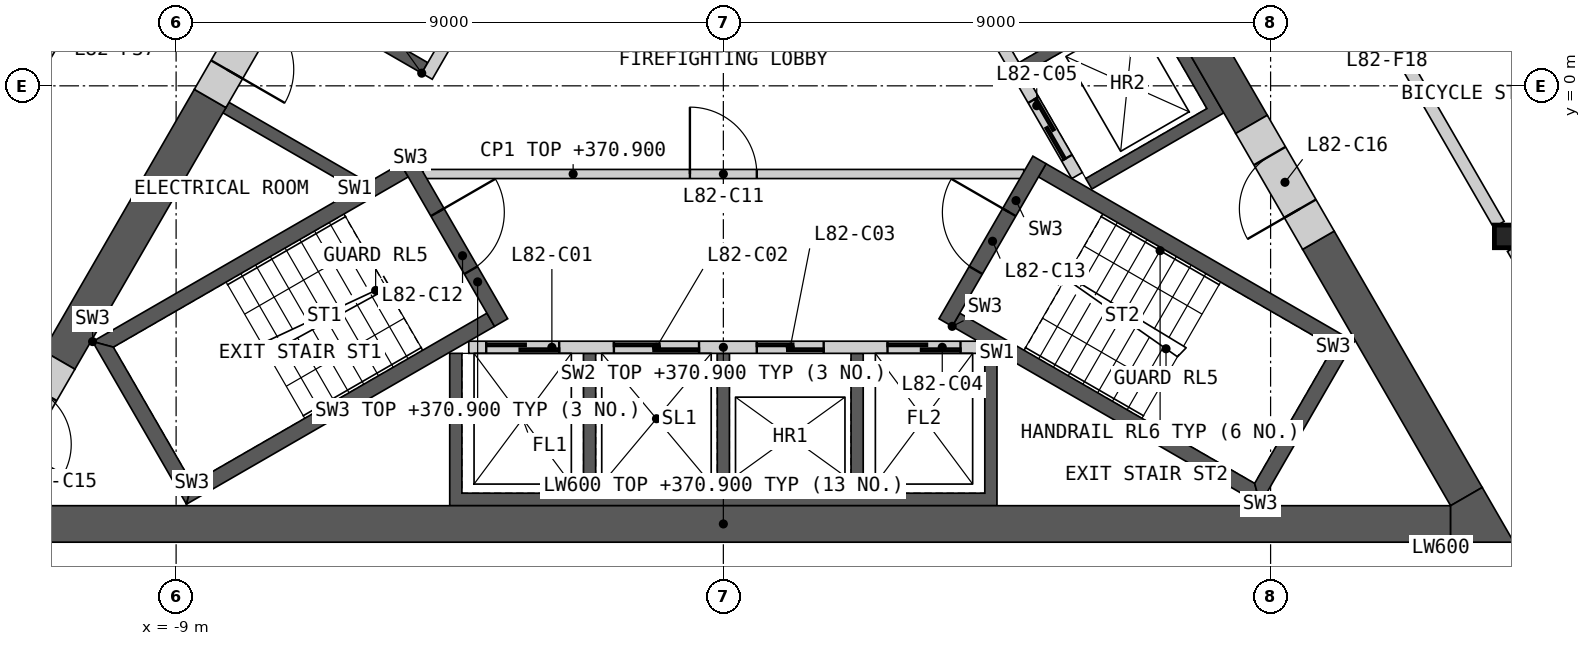
"""IFC4 building model, lengths in metres.
Left out: names, types, materials, properties, quantities, classifications, styles, units other than length and angle.
Written with IfcOpenShell. Run it as: python <this file> out.ifc"""

import sys

from ifc_helpers import new_model, si_unit, direction, frame, frame_2d, origin, origin_2d, place, context, subcontext, project, spatial, polyline, rectangle, i_section, outline, extrude, element, fill, save


model = new_model("IFC4")
c1 = context("Model", 3, precision=1e-05, world=origin(), true_north=direction((0.0, 1.0)))
c2 = subcontext(c1, "Body", "Model", "MODEL_VIEW")
j1 = project(units=[si_unit("LENGTHUNIT", "METRE"), si_unit("PLANEANGLEUNIT", "RADIAN")], contexts=[c1])
p1 = place(None, origin())
s1 = spatial("IfcSite", under=j1, at=p1, CompositionType="ELEMENT")
p2 = place(p1, origin())
s2 = spatial("IfcBuilding", under=s1, at=p2, CompositionType="ELEMENT")
p3 = place(p2, frame((0.0, 0.0, 367.8)))
s3 = spatial("IfcBuildingStorey", under=s2, at=p3, CompositionType="ELEMENT", Elevation=367.8)
p4 = place(p3, frame((12.868, -2.476, 0.0), z_axis=(0.0, 0.0, 1.0), x_axis=(1.0, 0.0, 0.0)))
e1 = element("IfcColumn", 1, at=p4, inside=s3, PredefinedType="COLUMN", context=c2, shape_type="SweptSolid", body=[
    extrude(i_section(OverallWidth=0.374, OverallDepth=0.372, WebThickness=0.016, FlangeThickness=0.026, at=origin_2d()), origin(), (0.0, 0.0, 1.0), 3.4),
])
p5 = place(p3, origin())
e2 = element("IfcWall", 2, at=p5, inside=s3, PredefinedType="SHEAR", context=c2, shape_type="SweptSolid", body=[
    extrude(outline(polyline([(4.5, -4.4), (4.5, -6.906), (-4.5, -6.906), (-4.5, -4.4), (-4.3, -4.4), (-4.3, -6.7), (-2.3, -6.7), (-2.3, -4.4), (-2.1, -4.4), (-2.1, -6.7), (-0.1, -6.7), (-0.1, -4.4), (0.1, -4.4), (0.1, -6.7), (2.1, -6.7), (2.1, -4.4), (2.3, -4.4), (2.3, -6.7), (4.3, -6.7), (4.3, -4.4), (4.5, -4.4)])), origin(), (0.0, 0.0, 1.0), 3.1),
])
p6 = place(p3, frame((-4.187, -4.3, 0.0), z_axis=(0.0, 0.0, 1.0), x_axis=(1.0, 0.0, 0.0)))
e3 = element("IfcWall", 3, at=p6, inside=s3, PredefinedType="SOLIDWALL", context=c2, shape_type="SweptSolid", body=[
    extrude(rectangle(XDim=8.373, YDim=0.2, at=frame_2d((4.187, 0.0))), origin(), (0.0, 0.0, 1.0), 3.1),
])
p7 = place(p6, frame((0.287, 0.0, 0.0)))
e4 = element("IfcOpeningElement", 4, at=p7, cuts=e3, PredefinedType="OPENING", context=c2, shape_type="SweptSolid", body=[
    extrude(rectangle(XDim=1.2, YDim=2.1, at=frame_2d((0.6, 1.05))), frame((0.0, 0.11, 0.0), z_axis=(0.0, -1.0, 0.0), x_axis=(1.0, 0.0, 0.0)), (0.0, 0.0, 1.0), 0.22),
])
p8 = place(p6, frame((2.387, 0.0, 0.0)))
e5 = element("IfcOpeningElement", 5, at=p8, cuts=e3, PredefinedType="OPENING", context=c2, shape_type="SweptSolid", body=[
    extrude(rectangle(XDim=1.4, YDim=2.1, at=frame_2d((0.7, 1.05))), frame((0.0, 0.11, 0.0), z_axis=(0.0, -1.0, 0.0), x_axis=(1.0, 0.0, 0.0)), (0.0, 0.0, 1.0), 0.22),
])
p9 = place(p6, frame((4.737, 0.0, 0.0)))
e6 = element("IfcOpeningElement", 6, at=p9, cuts=e3, PredefinedType="OPENING", context=c2, shape_type="SweptSolid", body=[
    extrude(rectangle(XDim=1.1, YDim=2.1, at=frame_2d((0.55, 1.05))), frame((0.0, 0.11, 0.0), z_axis=(0.0, -1.0, 0.0), x_axis=(1.0, 0.0, 0.0)), (0.0, 0.0, 1.0), 0.22),
])
p10 = place(p6, frame((6.887, 0.0, 0.0)))
e7 = element("IfcOpeningElement", 7, at=p10, cuts=e3, PredefinedType="OPENING", context=c2, shape_type="SweptSolid", body=[
    extrude(rectangle(XDim=1.2, YDim=2.1, at=frame_2d((0.6, 1.05))), frame((0.0, 0.11, 0.0), z_axis=(0.0, -1.0, 0.0), x_axis=(1.0, 0.0, 0.0)), (0.0, 0.0, 1.0), 0.22),
])
p11 = place(p3, origin())
e8 = element("IfcWall", 8, at=p11, inside=s3, PredefinedType="SHEAR", context=c2, shape_type="SweptSolid", body=[
    extrude(outline(polyline([(1.561, 6.097), (3.731, 7.35), (8.231, -0.444), (6.061, -1.697), (5.96, -1.524), (7.952, -0.374), (6.952, 1.358), (4.96, 0.208), (4.861, 0.381), (6.852, 1.531), (5.852, 3.263), (3.861, 2.113), (3.76, 2.287), (5.752, 3.437), (4.752, 5.169), (2.76, 4.019), (2.66, 4.192), (4.652, 5.342), (3.652, 7.074), (1.66, 5.924), (1.561, 6.097)])), origin(), (0.0, 0.0, 1.0), 3.1),
])
p12 = place(p3, frame((5.817, -1.476, 0.0), z_axis=(0.0, 0.0, 1.0), x_axis=(-0.500002616675, 0.866023893041, 0.0)))
e9 = element("IfcWall", 9, at=p12, inside=s3, PredefinedType="SOLIDWALL", context=c2, shape_type="SweptSolid", body=[
    extrude(rectangle(XDim=8.373, YDim=0.2, at=frame_2d((4.187, 0.0))), origin(), (0.0, 0.0, 1.0), 3.1),
])
p13 = place(p12, frame((0.337, 0.0, 0.0)))
e10 = element("IfcOpeningElement", 10, at=p13, cuts=e9, PredefinedType="OPENING", context=c2, shape_type="SweptSolid", body=[
    extrude(rectangle(XDim=1.1, YDim=2.1, at=frame_2d((0.55, 1.05))), frame((0.0, 0.11, 0.0), z_axis=(0.0, -1.0, 0.0), x_axis=(1.0, 0.0, 0.0)), (0.0, 0.0, 1.0), 0.22),
])
p14 = place(p12, frame((2.537, 0.0, 0.0)))
e11 = element("IfcOpeningElement", 11, at=p14, cuts=e9, PredefinedType="OPENING", context=c2, shape_type="SweptSolid", body=[
    extrude(rectangle(XDim=1.1, YDim=2.1, at=frame_2d((0.55, 1.05))), frame((0.0, 0.11, 0.0), z_axis=(0.0, -1.0, 0.0), x_axis=(1.0, 0.0, 0.0)), (0.0, 0.0, 1.0), 0.22),
])
p15 = place(p12, frame((4.737, 0.0, 0.0)))
e12 = element("IfcOpeningElement", 12, at=p15, cuts=e9, PredefinedType="OPENING", context=c2, shape_type="SweptSolid", body=[
    extrude(rectangle(XDim=1.1, YDim=2.1, at=frame_2d((0.55, 1.05))), frame((0.0, 0.11, 0.0), z_axis=(0.0, -1.0, 0.0), x_axis=(1.0, 0.0, 0.0)), (0.0, 0.0, 1.0), 0.22),
])
p16 = place(p12, frame((7.037, 0.0, 0.0)))
e13 = element("IfcOpeningElement", 13, at=p16, cuts=e9, PredefinedType="OPENING", context=c2, shape_type="SweptSolid", body=[
    extrude(rectangle(XDim=0.9, YDim=2.1, at=frame_2d((0.45, 1.05))), frame((0.0, 0.11, 0.0), z_axis=(0.0, -1.0, 0.0), x_axis=(1.0, 0.0, 0.0)), (0.0, 0.0, 1.0), 0.22),
])
p17 = place(p3, origin())
e14 = element("IfcWall", 14, at=p17, inside=s3, PredefinedType="SHEAR", context=c2, shape_type="SweptSolid", body=[
    extrude(outline(polyline([(-6.061, -1.697), (-8.231, -0.444), (-8.131, -0.271), (-5.96, -1.524), (-6.061, -1.697)])), origin(), (0.0, 0.0, 1.0), 3.1),
])
p18 = place(p3, origin())
e15 = element("IfcWall", 15, at=p18, inside=s3, PredefinedType="SHEAR", context=c2, shape_type="SweptSolid", body=[
    extrude(outline(polyline([(-4.96, 0.208), (-7.131, 1.461), (-3.731, 7.35), (-1.561, 6.097), (-1.66, 5.924), (-3.652, 7.074), (-5.752, 3.437), (-3.76, 2.287), (-3.861, 2.113), (-5.852, 3.263), (-6.852, 1.531), (-4.861, 0.381), (-4.96, 0.208)])), origin(), (0.0, 0.0, 1.0), 3.1),
])
p19 = place(p3, frame((-1.631, 5.776, 0.0), z_axis=(0.0, 0.0, 1.0), x_axis=(-0.499992876559, -0.866029516466, 0.0)))
e16 = element("IfcWall", 16, at=p19, inside=s3, PredefinedType="SOLIDWALL", context=c2, shape_type="SweptSolid", body=[
    extrude(rectangle(XDim=6.486, YDim=0.2, at=frame_2d((3.243, 0.0))), origin(), (0.0, 0.0, 1.0), 3.1),
])
p20 = place(p19, frame((1.537, 0.0, 0.0)))
e17 = element("IfcOpeningElement", 17, at=p20, cuts=e16, PredefinedType="OPENING", context=c2, shape_type="SweptSolid", body=[
    extrude(rectangle(XDim=0.9, YDim=2.1, at=frame_2d((0.45, 1.05))), frame((0.0, 0.11, 0.0), z_axis=(0.0, -1.0, 0.0), x_axis=(1.0, 0.0, 0.0)), (0.0, 0.0, 1.0), 0.22),
])
p21 = place(p19, frame((4.837, 0.0, 0.0)))
e18 = element("IfcOpeningElement", 18, at=p21, cuts=e16, PredefinedType="OPENING", context=c2, shape_type="SweptSolid", body=[
    extrude(rectangle(XDim=0.9, YDim=2.1, at=frame_2d((0.45, 1.05))), frame((0.0, 0.11, 0.0), z_axis=(0.0, -1.0, 0.0), x_axis=(1.0, 0.0, 0.0)), (0.0, 0.0, 1.0), 0.22),
])
p22 = place(p3, frame((-4.941, -1.45, 0.0), z_axis=(0.0, 0.0, 1.0), x_axis=(1.0, 0.0, 0.0)))
e19 = element("IfcWall", 19, at=p22, inside=s3, PredefinedType="PARTITIONING", context=c2, shape_type="SweptSolid", body=[
    extrude(rectangle(XDim=9.882, YDim=0.15, at=frame_2d((4.941, 0.0))), origin(), (0.0, 0.0, 1.0), 3.1),
])
p23 = place(p22, frame((4.391, 0.0, 0.0)))
e20 = element("IfcOpeningElement", 20, at=p23, cuts=e19, PredefinedType="OPENING", context=c2, shape_type="SweptSolid", body=[
    extrude(rectangle(XDim=1.1, YDim=2.1, at=frame_2d((0.55, 1.05))), frame((0.0, 0.085, 0.0), z_axis=(0.0, -1.0, 0.0), x_axis=(1.0, 0.0, 0.0)), (0.0, 0.0, 1.0), 0.17),
])
p24 = place(p3, origin())
e21 = element("IfcWall", 21, at=p24, inside=s3, PredefinedType="SHEAR", context=c2, shape_type="SweptSolid", body=[
    extrude(outline(polyline([(-5.307, -1.281), (-10.374, -4.206), (-10.032, -4.298), (-5.182, -1.498), (-5.307, -1.281)])), origin(), (0.0, 0.0, 1.0), 3.1),
])
p25 = place(p3, origin())
e22 = element("IfcWall", 22, at=p25, inside=s3, PredefinedType="SHEAR", context=c2, shape_type="SweptSolid", body=[
    extrude(outline(polyline([(-10.374, -4.206), (-8.83, -6.881), (-8.738, -6.539), (-10.032, -4.298), (-10.374, -4.206)])), origin(), (0.0, 0.0, 1.0), 3.1),
])
p26 = place(p3, origin())
e23 = element("IfcWall", 23, at=p26, inside=s3, PredefinedType="SHEAR", context=c2, shape_type="SweptSolid", body=[
    extrude(outline(polyline([(-8.738, -6.539), (-8.83, -6.881), (-3.763, -3.956), (-3.888, -3.739), (-8.738, -6.539)])), origin(), (0.0, 0.0, 1.0), 3.1),
])
p27 = place(p3, frame((-5.199, -1.219, 0.0), z_axis=(0.0, 0.0, 1.0), x_axis=(0.499982516597, -0.866035497597, 0.0)))
e24 = element("IfcWall", 24, at=p27, inside=s3, PredefinedType="SHEAR", context=c2, shape_type="SweptSolid", body=[
    extrude(rectangle(XDim=3.088, YDim=0.25, at=frame_2d((1.544, 0.0))), origin(), (0.0, 0.0, 1.0), 3.1),
])
p28 = place(p27, frame((0.994, 0.0, 0.0)))
e25 = element("IfcOpeningElement", 25, at=p28, cuts=e24, PredefinedType="OPENING", context=c2, shape_type="SweptSolid", body=[
    extrude(rectangle(XDim=1.1, YDim=2.1, at=frame_2d((0.55, 1.05))), frame((0.0, 0.135, 0.0), z_axis=(0.0, -1.0, 0.0), x_axis=(1.0, 0.0, 0.0)), (0.0, 0.0, 1.0), 0.27),
])
p29 = place(p3, origin())
e26 = element("IfcWall", 26, at=p29, inside=s3, PredefinedType="SHEAR", context=c2, shape_type="SweptSolid", body=[
    extrude(outline(polyline([(3.763, -3.956), (8.83, -6.881), (8.738, -6.539), (3.888, -3.739), (3.763, -3.956)])), origin(), (0.0, 0.0, 1.0), 3.1),
])
p30 = place(p3, origin())
e27 = element("IfcWall", 27, at=p30, inside=s3, PredefinedType="SHEAR", context=c2, shape_type="SweptSolid", body=[
    extrude(outline(polyline([(8.83, -6.881), (10.374, -4.206), (10.032, -4.298), (8.738, -6.539), (8.83, -6.881)])), origin(), (0.0, 0.0, 1.0), 3.1),
])
p31 = place(p3, origin())
e28 = element("IfcWall", 28, at=p31, inside=s3, PredefinedType="SHEAR", context=c2, shape_type="SweptSolid", body=[
    extrude(outline(polyline([(10.032, -4.298), (10.374, -4.206), (5.307, -1.281), (5.182, -1.498), (10.032, -4.298)])), origin(), (0.0, 0.0, 1.0), 3.1),
])
p32 = place(p3, frame((3.655, -3.893, 0.0), z_axis=(0.0, 0.0, 1.0), x_axis=(0.499982516597, 0.866035497597, 0.0)))
e29 = element("IfcWall", 29, at=p32, inside=s3, PredefinedType="SHEAR", context=c2, shape_type="SweptSolid", body=[
    extrude(rectangle(XDim=3.088, YDim=0.25, at=frame_2d((1.544, 0.0))), origin(), (0.0, 0.0, 1.0), 3.1),
])
p33 = place(p32, frame((0.994, 0.0, 0.0)))
e30 = element("IfcOpeningElement", 30, at=p33, cuts=e29, PredefinedType="OPENING", context=c2, shape_type="SweptSolid", body=[
    extrude(rectangle(XDim=1.1, YDim=2.1, at=frame_2d((0.55, 1.05))), frame((0.0, 0.135, 0.0), z_axis=(0.0, -1.0, 0.0), x_axis=(1.0, 0.0, 0.0)), (0.0, 0.0, 1.0), 0.27),
])
p34 = place(p3, frame((-11.961, -7.206, 0.0), z_axis=(0.0, 0.0, 1.0), x_axis=(1.0, 0.0, 0.0)))
e31 = element("IfcWall", 31, at=p34, inside=s3, PredefinedType="SHEAR", context=c2, shape_type="SweptSolid", body=[
    extrude(rectangle(XDim=23.921, YDim=0.6, at=frame_2d((11.961, 0.0))), origin(), (0.0, 0.0, 1.0), 3.1),
])
p35 = place(p3, frame((8.686, -0.634, 0.0), z_axis=(0.0, 0.0, 1.0), x_axis=(-0.50001836461, 0.866014800712, 0.0)))
e32 = element("IfcWall", 32, at=p35, inside=s3, PredefinedType="SHEAR", context=c2, shape_type="SweptSolid", body=[
    extrude(rectangle(XDim=10.451, YDim=0.6, at=frame_2d((5.225, 0.0))), origin(), (0.0, 0.0, 1.0), 3.1),
])
p36 = place(p3, frame((12.221, -6.756, 0.0), z_axis=(0.0, 0.0, 1.0), x_axis=(-0.50000604952, 0.866021911064, 0.0)))
e33 = element("IfcWall", 33, at=p36, inside=s3, PredefinedType="SHEAR", context=c2, shape_type="SweptSolid", body=[
    extrude(rectangle(XDim=4.869, YDim=0.6, at=frame_2d((2.434, 0.0))), origin(), (0.0, 0.0, 1.0), 3.1),
])
p37 = place(p3, frame((-8.44, -0.208, 0.0), z_axis=(0.0, 0.0, 1.0), x_axis=(-0.500007425856, -0.866021116422, 0.0)))
e34 = element("IfcWall", 34, at=p37, inside=s3, PredefinedType="SHEAR", context=c2, shape_type="SweptSolid", body=[
    extrude(rectangle(XDim=4.969, YDim=0.6, at=frame_2d((2.484, 0.0))), origin(), (0.0, 0.0, 1.0), 3.1),
])
p38 = place(p3, origin())
e35 = element("IfcWall", 35, at=p38, inside=s3, PredefinedType="SHEAR", context=c2, shape_type="SweptSolid", body=[
    extrude(outline(polyline([(11.961, -7.506), (11.961, -6.906), (12.48, -6.606), (13.0, -7.506), (11.961, -7.506)])), origin(), (0.0, 0.0, 1.0), 3.1),
])
p39 = place(p3, frame((-10.925, -4.511, 0.0), z_axis=(0.0, 0.0, 1.0), x_axis=(-0.500018667571, -0.866014625789, 0.0)))
e36 = element("IfcWall", 36, at=p39, inside=s3, PredefinedType="SHEAR", context=c2, shape_type="SweptSolid", body=[
    extrude(rectangle(XDim=2.592, YDim=0.6, at=frame_2d((1.296, 0.0))), origin(), (0.0, 0.0, 1.0), 3.1),
])
p40 = place(p39, frame((0.6, 0.0, 0.0)))
e37 = element("IfcOpeningElement", 37, at=p40, cuts=e36, PredefinedType="OPENING", context=c2, shape_type="SweptSolid", body=[
    extrude(rectangle(XDim=1.0, YDim=2.1, at=frame_2d((0.5, 1.05))), frame((0.0, 0.31, 0.0), z_axis=(0.0, -1.0, 0.0), x_axis=(1.0, 0.0, 0.0)), (0.0, 0.0, 1.0), 0.62),
])
p41 = place(p3, frame((9.786, -2.539, 0.0), z_axis=(0.0, 0.0, 1.0), x_axis=(-0.499981787252, 0.866035918664, 0.0)))
e38 = element("IfcWall", 38, at=p41, inside=s3, PredefinedType="SHEAR", context=c2, shape_type="SweptSolid", body=[
    extrude(rectangle(XDim=2.2, YDim=0.6, at=frame_2d((1.1, 0.0))), origin(), (0.0, 0.0, 1.0), 3.1),
])
p42 = place(p41, frame((0.6, 0.0, 0.0)))
e39 = element("IfcOpeningElement", 39, at=p42, cuts=e38, PredefinedType="OPENING", context=c2, shape_type="SweptSolid", body=[
    extrude(rectangle(XDim=1.0, YDim=2.1, at=frame_2d((0.5, 1.05))), frame((0.0, 0.31, 0.0), z_axis=(0.0, -1.0, 0.0), x_axis=(1.0, 0.0, 0.0)), (0.0, 0.0, 1.0), 0.62),
])
p43 = place(p3, frame((-7.34, 1.698, 0.0), z_axis=(0.0, 0.0, 1.0), x_axis=(-0.50002983664, -0.866008176907, 0.0)))
e40 = element("IfcWall", 40, at=p43, inside=s3, PredefinedType="SHEAR", context=c2, shape_type="SweptSolid", body=[
    extrude(rectangle(XDim=2.2, YDim=0.6, at=frame_2d((1.1, 0.0))), origin(), (0.0, 0.0, 1.0), 3.1),
])
p44 = place(p43, frame((0.55, 0.0, 0.0)))
e41 = element("IfcOpeningElement", 41, at=p44, cuts=e40, PredefinedType="OPENING", context=c2, shape_type="SweptSolid", body=[
    extrude(rectangle(XDim=1.1, YDim=2.1, at=frame_2d((0.55, 1.05))), frame((0.0, 0.31, 0.0), z_axis=(0.0, -1.0, 0.0), x_axis=(1.0, 0.0, 0.0)), (0.0, 0.0, 1.0), 0.62),
])
p45 = place(p3, frame((-12.754, -2.279, 0.0), z_axis=(0.0, 0.0, 1.0), x_axis=(0.500001682468, 0.866024432409, 0.0)))
e42 = element("IfcWall", 42, at=p45, inside=s3, PredefinedType="PARTITIONING", context=c2, shape_type="SweptSolid", body=[
    extrude(rectangle(XDim=8.124, YDim=0.2, at=frame_2d((4.062, 0.0))), origin(), (0.0, 0.0, 1.0), 3.1),
])
p46 = place(p45, frame((3.762, 0.0, 0.0)))
e43 = element("IfcOpeningElement", 43, at=p46, cuts=e42, PredefinedType="OPENING", context=c2, shape_type="SweptSolid", body=[
    extrude(rectangle(XDim=1.0, YDim=2.1, at=frame_2d((0.5, 1.05))), frame((0.0, 0.11, 0.0), z_axis=(0.0, -1.0, 0.0), x_axis=(1.0, 0.0, 0.0)), (0.0, 0.0, 1.0), 0.22),
])
p47 = place(p3, frame((8.692, 4.756, 0.0), z_axis=(0.0, 0.0, 1.0), x_axis=(0.500001682468, -0.866024432409, 0.0)))
e44 = element("IfcWall", 44, at=p47, inside=s3, PredefinedType="PARTITIONING", context=c2, shape_type="SweptSolid", body=[
    extrude(rectangle(XDim=8.124, YDim=0.2, at=frame_2d((4.062, 0.0))), origin(), (0.0, 0.0, 1.0), 3.1),
])
p48 = place(p47, frame((3.587, 0.0, 0.0)))
e45 = element("IfcOpeningElement", 45, at=p48, cuts=e44, PredefinedType="OPENING", context=c2, shape_type="SweptSolid", body=[
    extrude(rectangle(XDim=0.95, YDim=2.1, at=frame_2d((0.475, 1.05))), frame((0.0, 0.11, 0.0), z_axis=(0.0, -1.0, 0.0), x_axis=(1.0, 0.0, 0.0)), (0.0, 0.0, 1.0), 0.22),
])
p49 = place(p3, frame((12.981, -2.673, 0.0), z_axis=(0.0, 0.0, 1.0), x_axis=(0.499974648164, -0.866040040179, 0.0)))
e46 = element("IfcWall", 46, at=p49, inside=s3, PredefinedType="PARTITIONING", context=c2, shape_type="SweptSolid", body=[
    extrude(rectangle(XDim=4.525, YDim=0.2, at=frame_2d((2.263, 0.0))), origin(), (0.0, 0.0, 1.0), 3.1),
])
p50 = place(p3, frame((11.573, 6.566, 0.0), z_axis=(0.0, 0.0, 1.0), x_axis=(0.499993542657, -0.866029131901, 0.0)))
e47 = element("IfcWall", 47, at=p50, inside=s3, PredefinedType="PARTITIONING", context=c2, shape_type="SweptSolid", body=[
    extrude(rectangle(XDim=14.994, YDim=0.2, at=frame_2d((7.497, 0.0))), origin(), (0.0, 0.0, 1.0), 2.33),
])
p51 = place(p50, frame((5.166, 0.0, 0.0)))
e48 = element("IfcOpeningElement", 48, at=p51, cuts=e47, PredefinedType="OPENING", context=c2, shape_type="SweptSolid", body=[
    extrude(rectangle(XDim=0.95, YDim=2.1, at=frame_2d((0.475, 1.05))), frame((0.0, 0.11, 0.0), z_axis=(0.0, -1.0, 0.0), x_axis=(1.0, 0.0, 0.0)), (0.0, 0.0, 1.0), 0.22),
])
p52 = place(p7, origin())
e49 = element("IfcDoor", 49, at=p52, inside=s3, OperationType="SLIDING_TO_LEFT", PredefinedType="DOOR", context=c2, shape_type="SweptSolid", body=[
    extrude(rectangle(XDim=1.2, YDim=2.1, at=frame_2d((0.6, 1.05))), frame((0.0, 0.025, 0.0), z_axis=(0.0, -1.0, 0.0), x_axis=(1.0, 0.0, 0.0)), (0.0, 0.0, 1.0), 0.05),
])
fill(e4, e49)
p53 = place(p8, origin())
e50 = element("IfcDoor", 50, at=p53, inside=s3, OperationType="SLIDING_TO_LEFT", PredefinedType="DOOR", context=c2, shape_type="SweptSolid", body=[
    extrude(rectangle(XDim=1.4, YDim=2.1, at=frame_2d((0.7, 1.05))), frame((0.0, 0.025, 0.0), z_axis=(0.0, -1.0, 0.0), x_axis=(1.0, 0.0, 0.0)), (0.0, 0.0, 1.0), 0.05),
])
fill(e5, e50)
p54 = place(p9, origin())
e51 = element("IfcDoor", 51, at=p54, inside=s3, OperationType="SLIDING_TO_LEFT", PredefinedType="DOOR", context=c2, shape_type="SweptSolid", body=[
    extrude(rectangle(XDim=1.1, YDim=2.1, at=frame_2d((0.55, 1.05))), frame((0.0, 0.025, 0.0), z_axis=(0.0, -1.0, 0.0), x_axis=(1.0, 0.0, 0.0)), (0.0, 0.0, 1.0), 0.05),
])
fill(e6, e51)
p55 = place(p10, origin())
e52 = element("IfcDoor", 52, at=p55, inside=s3, OperationType="SLIDING_TO_LEFT", PredefinedType="DOOR", context=c2, shape_type="SweptSolid", body=[
    extrude(rectangle(XDim=1.2, YDim=2.1, at=frame_2d((0.6, 1.05))), frame((0.0, 0.025, 0.0), z_axis=(0.0, -1.0, 0.0), x_axis=(1.0, 0.0, 0.0)), (0.0, 0.0, 1.0), 0.05),
])
fill(e7, e52)
p56 = place(p13, origin())
e53 = element("IfcDoor", 53, at=p56, inside=s3, OperationType="SLIDING_TO_LEFT", PredefinedType="DOOR", context=c2, shape_type="SweptSolid", body=[
    extrude(rectangle(XDim=1.1, YDim=2.1, at=frame_2d((0.55, 1.05))), frame((0.0, 0.025, 0.0), z_axis=(0.0, -1.0, 0.0), x_axis=(1.0, 0.0, 0.0)), (0.0, 0.0, 1.0), 0.05),
])
fill(e10, e53)
p57 = place(p23, origin())
e54 = element("IfcDoor", 54, at=p57, inside=s3, OperationType="SINGLE_SWING_LEFT", PredefinedType="DOOR", context=c2, shape_type="SweptSolid", body=[
    extrude(rectangle(XDim=1.1, YDim=2.1, at=frame_2d((0.55, 1.05))), frame((0.0, 0.025, 0.0), z_axis=(0.0, -1.0, 0.0), x_axis=(1.0, 0.0, 0.0)), (0.0, 0.0, 1.0), 0.05),
])
fill(e20, e54)
p58 = place(p28, origin())
e55 = element("IfcDoor", 55, at=p58, inside=s3, OperationType="SINGLE_SWING_LEFT", PredefinedType="DOOR", context=c2, shape_type="SweptSolid", body=[
    extrude(rectangle(XDim=1.1, YDim=2.1, at=frame_2d((0.55, 1.05))), frame((0.0, 0.025, 0.0), z_axis=(0.0, -1.0, 0.0), x_axis=(1.0, 0.0, 0.0)), (0.0, 0.0, 1.0), 0.05),
])
fill(e25, e55)
p59 = place(p33, origin())
e56 = element("IfcDoor", 56, at=p59, inside=s3, OperationType="SINGLE_SWING_RIGHT", PredefinedType="DOOR", context=c2, shape_type="SweptSolid", body=[
    extrude(rectangle(XDim=1.1, YDim=2.1, at=frame_2d((0.55, 1.05))), frame((0.0, 0.025, 0.0), z_axis=(0.0, -1.0, 0.0), x_axis=(1.0, 0.0, 0.0)), (0.0, 0.0, 1.0), 0.05),
])
fill(e30, e56)
p60 = place(p42, origin())
e57 = element("IfcDoor", 57, at=p60, inside=s3, OperationType="SINGLE_SWING_LEFT", PredefinedType="DOOR", context=c2, shape_type="SweptSolid", body=[
    extrude(rectangle(XDim=1.0, YDim=2.1, at=frame_2d((0.5, 1.05))), frame((0.0, 0.055, 0.0), z_axis=(0.0, -1.0, 0.0), x_axis=(1.0, 0.0, 0.0)), (0.0, 0.0, 1.0), 0.05),
])
fill(e39, e57)
p61 = place(p44, origin())
e58 = element("IfcDoor", 58, at=p61, inside=s3, OperationType="SINGLE_SWING_RIGHT", PredefinedType="DOOR", context=c2, shape_type="SweptSolid", body=[
    extrude(rectangle(XDim=1.1, YDim=2.1, at=frame_2d((0.55, 1.05))), frame((0.0, 0.055, 0.0), z_axis=(0.0, -1.0, 0.0), x_axis=(1.0, 0.0, 0.0)), (0.0, 0.0, 1.0), 0.05),
])
fill(e41, e58)
save(model, sys.argv[1])
